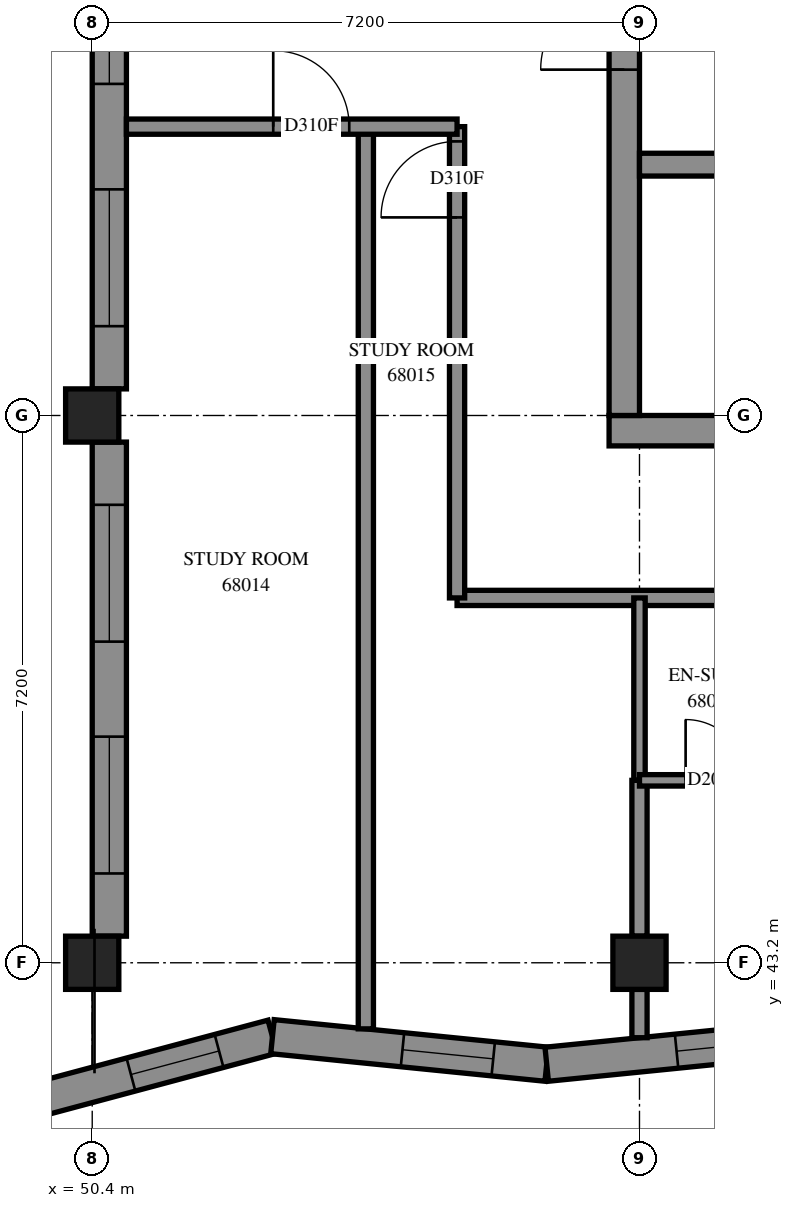
"""IFC4 building model, lengths in metres.
Left out: names, types, materials, properties, quantities, classifications, styles, units other than length and angle.
Written with IfcOpenShell. Run it as: python <this file> out.ifc"""

import sys

from ifc_helpers import new_model, si_unit, direction, frame, frame_2d, origin, origin_2d, place, context, subcontext, project, spatial, polyline, rectangle, outline, extrude, element, fill, save


model = new_model("IFC4")
c1 = context("Model", 3, precision=1e-05, world=origin(), true_north=direction((0.0, 1.0)))
c2 = subcontext(c1, "Body", "Model", "MODEL_VIEW")
j1 = project(units=[si_unit("LENGTHUNIT", "METRE"), si_unit("PLANEANGLEUNIT", "RADIAN")], contexts=[c1])
p1 = place(None, origin())
s1 = spatial("IfcSite", under=j1, at=p1, CompositionType="ELEMENT")
p2 = place(p1, origin())
s2 = spatial("IfcBuilding", under=s1, at=p2, CompositionType="ELEMENT")
p3 = place(p2, frame((0.0, 0.0, 250.6)))
s3 = spatial("IfcBuildingStorey", under=s2, at=p3, CompositionType="ELEMENT", Elevation=250.6)
for number, where, z_axis, x_axis in (
    (1, (50.4, 43.2, 0.0), (0.0, 0.0, 1.0), (1.0, 0.0, 0.0)),
    (2, (50.4, 50.4, 0.0), (0.0, 0.0, 1.0), (1.0, 0.0, 0.0)),
    (3, (57.6, 43.2, 0.0), (0.0, 0.0, 1.0), (1.0, 0.0, 0.0)),
):
    element("IfcColumn", number, at=place(p3, frame(where, z_axis=z_axis, x_axis=x_axis)), inside=s3, PredefinedType="COLUMN", context=c2, shape_type="SweptSolid", body=[
        extrude(rectangle(XDim=0.7, YDim=0.7, at=origin_2d()), origin(), (0.0, 0.0, 1.0), 3.1),
    ])
p4 = place(p3, frame((57.2, 50.2, -0.3), z_axis=(0.0, 0.0, 1.0), x_axis=(1.0, 0.0, 0.0)))
e4 = element("IfcWall", 4, at=p4, inside=s3, PredefinedType="SHEAR", context=c2, shape_type="SweptSolid", body=[
    extrude(rectangle(XDim=15.2, YDim=0.4, at=frame_2d((7.6, 0.0))), origin(), (0.0, 0.0, 1.0), 2.7),
])
p5 = place(p3, frame((57.4, 50.4, -0.3), z_axis=(0.0, 0.0, 1.0), x_axis=(0.0, 1.0, 0.0)))
e5 = element("IfcWall", 5, at=p5, inside=s3, PredefinedType="SHEAR", context=c2, shape_type="SweptSolid", body=[
    extrude(rectangle(XDim=14.4, YDim=0.4, at=frame_2d((7.2, 0.0))), origin(), (0.0, 0.0, 1.0), 2.7),
])
p6 = place(p5, frame((4.55, 0.0, 0.3)))
e6 = element("IfcOpeningElement", 6, at=p6, cuts=e5, PredefinedType="OPENING", context=c2, shape_type="SweptSolid", body=[
    extrude(rectangle(XDim=1.1, YDim=2.1, at=frame_2d((0.55, 1.05))), frame((0.0, 0.21, 0.0), z_axis=(0.0, -1.0, 0.0), x_axis=(1.0, 0.0, 0.0)), (0.0, 0.0, 1.0), 0.42),
])
p7 = place(p5, frame((11.35, 0.0, 0.3)))
e7 = element("IfcOpeningElement", 7, at=p7, cuts=e5, PredefinedType="OPENING", context=c2, shape_type="SweptSolid", body=[
    extrude(rectangle(XDim=1.1, YDim=2.1, at=frame_2d((0.55, 1.05))), frame((0.0, 0.21, 0.0), z_axis=(0.0, -1.0, 0.0), x_axis=(1.0, 0.0, 0.0)), (0.0, 0.0, 1.0), 0.42),
])
p8 = place(p3, frame((57.6, 53.7, 0.0), z_axis=(0.0, 0.0, 1.0), x_axis=(1.0, 0.0, 0.0)))
e8 = element("IfcWall", 8, at=p8, inside=s3, PredefinedType="SOLIDWALL", context=c2, shape_type="SweptSolid", body=[
    extrude(rectangle(XDim=14.4, YDim=0.3, at=frame_2d((7.2, 0.0))), origin(), (0.0, 0.0, 1.0), 3.1),
])
p9 = place(p8, frame((1.35, 0.0, 0.0)))
e9 = element("IfcOpeningElement", 9, at=p9, cuts=e8, PredefinedType="OPENING", context=c2, shape_type="SweptSolid", body=[
    extrude(rectangle(XDim=0.9, YDim=2.1, at=frame_2d((0.45, 1.05))), frame((0.0, 0.16, 0.0), z_axis=(0.0, -1.0, 0.0), x_axis=(1.0, 0.0, 0.0)), (0.0, 0.0, 1.0), 0.32),
])
p10 = place(p8, frame((4.95, 0.0, 0.0)))
e10 = element("IfcOpeningElement", 10, at=p10, cuts=e8, PredefinedType="OPENING", context=c2, shape_type="SweptSolid", body=[
    extrude(rectangle(XDim=0.9, YDim=2.1, at=frame_2d((0.45, 1.05))), frame((0.0, 0.16, 0.0), z_axis=(0.0, -1.0, 0.0), x_axis=(1.0, 0.0, 0.0)), (0.0, 0.0, 1.0), 0.32),
])
p11 = place(p8, frame((8.55, 0.0, 0.0)))
e11 = element("IfcOpeningElement", 11, at=p11, cuts=e8, PredefinedType="OPENING", context=c2, shape_type="SweptSolid", body=[
    extrude(rectangle(XDim=0.9, YDim=2.1, at=frame_2d((0.45, 1.05))), frame((0.0, 0.16, 0.0), z_axis=(0.0, -1.0, 0.0), x_axis=(1.0, 0.0, 0.0)), (0.0, 0.0, 1.0), 0.32),
])
p12 = place(p8, frame((12.05, 0.0, 0.0)))
e12 = element("IfcOpeningElement", 12, at=p12, cuts=e8, PredefinedType="OPENING", context=c2, shape_type="SweptSolid", body=[
    extrude(rectangle(XDim=1.1, YDim=2.1, at=frame_2d((0.55, 1.05))), frame((0.0, 0.16, 0.0), z_axis=(0.0, -1.0, 0.0), x_axis=(1.0, 0.0, 0.0)), (0.0, 0.0, 1.0), 0.32),
])
p13 = place(p3, frame((49.425, 41.332, 0.0), z_axis=(0.0, 0.0, 1.0), x_axis=(0.965984374, 0.258600443, 0.0)))
e13 = element("IfcWall", 13, at=p13, inside=s3, PredefinedType="SOLIDWALL", context=c2, shape_type="SweptSolid", body=[
    extrude(outline(polyline([(-0.293, -0.225), (3.423, -0.225), (3.505, 0.225), (0.293, 0.225), (-0.293, -0.225)])), origin(), (0.0, 0.0, 1.0), 3.1),
])
p14 = place(p13, frame((1.537, 0.0, 0.45)))
e14 = element("IfcOpeningElement", 14, at=p14, cuts=e13, PredefinedType="OPENING", context=c2, shape_type="SweptSolid", body=[
    extrude(rectangle(XDim=1.2, YDim=2.55, at=frame_2d((0.6, 1.275))), frame((0.0, 0.235, 0.0), z_axis=(0.0, -1.0, 0.0), x_axis=(1.0, 0.0, 0.0)), (0.0, 0.0, 1.0), 0.47),
])
p15 = place(p3, frame((52.771, 42.228, 0.0), z_axis=(0.0, 0.0, 1.0), x_axis=(0.9949796866, -0.1000770865, 0.0)))
e15 = element("IfcWall", 15, at=p15, inside=s3, PredefinedType="SOLIDWALL", context=c2, shape_type="SweptSolid", body=[
    extrude(outline(polyline([(0.041, -0.225), (3.649, -0.225), (3.604, 0.225), (-0.041, 0.225), (0.041, -0.225)])), origin(), (0.0, 0.0, 1.0), 3.1),
])
p16 = place(p15, frame((1.719, 0.0, 0.45)))
e16 = element("IfcOpeningElement", 16, at=p16, cuts=e15, PredefinedType="OPENING", context=c2, shape_type="SweptSolid", body=[
    extrude(rectangle(XDim=1.2, YDim=2.55, at=frame_2d((0.6, 1.275))), frame((0.0, 0.235, 0.0), z_axis=(0.0, -1.0, 0.0), x_axis=(1.0, 0.0, 0.0)), (0.0, 0.0, 1.0), 0.47),
])
p17 = place(p3, frame((56.379, 41.865, 0.0), z_axis=(0.0, 0.0, 1.0), x_axis=(0.994981047, 0.1000635608, 0.0)))
e17 = element("IfcWall", 17, at=p17, inside=s3, PredefinedType="SOLIDWALL", context=c2, shape_type="SweptSolid", body=[
    extrude(outline(polyline([(-0.023, -0.225), (3.585, -0.225), (3.63, 0.225), (0.023, 0.225), (-0.023, -0.225)])), origin(), (0.0, 0.0, 1.0), 3.1),
])
p18 = place(p17, frame((1.717, 0.0, 0.45)))
e18 = element("IfcOpeningElement", 18, at=p18, cuts=e17, PredefinedType="OPENING", context=c2, shape_type="SweptSolid", body=[
    extrude(rectangle(XDim=1.2, YDim=2.55, at=frame_2d((0.6, 1.275))), frame((0.0, 0.235, 0.0), z_axis=(0.0, -1.0, 0.0), x_axis=(1.0, 0.0, 0.0)), (0.0, 0.0, 1.0), 0.47),
])
p19 = place(p3, frame((50.625, 57.25, 0.0), z_axis=(0.0, 0.0, 1.0), x_axis=(0.0, -1.0, 0.0)))
e19 = element("IfcWall", 19, at=p19, inside=s3, PredefinedType="SOLIDWALL", context=c2, shape_type="SweptSolid", body=[
    extrude(rectangle(XDim=6.5, YDim=0.45, at=frame_2d((3.25, 0.0))), origin(), (0.0, 0.0, 1.0), 3.1),
])
p20 = place(p19, frame((3.875, 0.0, 0.7)))
e20 = element("IfcOpeningElement", 20, at=p20, cuts=e19, PredefinedType="OPENING", context=c2, shape_type="SweptSolid", body=[
    extrude(rectangle(XDim=1.8, YDim=1.8, at=frame_2d((0.9, 0.9))), frame((0.0, 0.235, 0.0), z_axis=(0.0, -1.0, 0.0), x_axis=(1.0, 0.0, 0.0)), (0.0, 0.0, 1.0), 0.47),
])
p21 = place(p19, frame((1.288, 0.0, 0.6)))
e21 = element("IfcOpeningElement", 21, at=p21, cuts=e19, PredefinedType="OPENING", context=c2, shape_type="SweptSolid", body=[
    extrude(rectangle(XDim=1.2, YDim=1.9, at=frame_2d((0.6, 0.95))), frame((0.0, 0.235, 0.0), z_axis=(0.0, -1.0, 0.0), x_axis=(1.0, 0.0, 0.0)), (0.0, 0.0, 1.0), 0.47),
])
p22 = place(p3, frame((50.625, 50.05, 0.0), z_axis=(0.0, 0.0, 1.0), x_axis=(0.0, -1.0, 0.0)))
e22 = element("IfcWall", 22, at=p22, inside=s3, PredefinedType="SOLIDWALL", context=c2, shape_type="SweptSolid", body=[
    extrude(rectangle(XDim=6.5, YDim=0.45, at=frame_2d((3.25, 0.0))), origin(), (0.0, 0.0, 1.0), 3.1),
])
p23 = place(p22, frame((0.825, 0.0, 0.7)))
e23 = element("IfcOpeningElement", 23, at=p23, cuts=e22, PredefinedType="OPENING", context=c2, shape_type="SweptSolid", body=[
    extrude(rectangle(XDim=1.8, YDim=1.8, at=frame_2d((0.9, 0.9))), frame((0.0, 0.235, 0.0), z_axis=(0.0, -1.0, 0.0), x_axis=(1.0, 0.0, 0.0)), (0.0, 0.0, 1.0), 0.47),
])
p24 = place(p22, frame((3.875, 0.0, 0.7)))
e24 = element("IfcOpeningElement", 24, at=p24, cuts=e22, PredefinedType="OPENING", context=c2, shape_type="SweptSolid", body=[
    extrude(rectangle(XDim=1.8, YDim=1.8, at=frame_2d((0.9, 0.9))), frame((0.0, 0.235, 0.0), z_axis=(0.0, -1.0, 0.0), x_axis=(1.0, 0.0, 0.0)), (0.0, 0.0, 1.0), 0.47),
])
p25 = place(p3, frame((55.2, 48.0, 0.0), z_axis=(0.0, 0.0, 1.0), x_axis=(1.0, 0.0, 0.0)))
e25 = element("IfcWall", 25, at=p25, inside=s3, PredefinedType="PARTITIONING", context=c2, shape_type="SweptSolid", body=[
    extrude(rectangle(XDim=19.15, YDim=0.2, at=frame_2d((9.575, 0.0))), origin(), (0.0, 0.0, 1.0), 3.1),
])
p26 = place(p25, frame((6.299, 0.0, 0.0)))
e26 = element("IfcOpeningElement", 26, at=p26, cuts=e25, PredefinedType="OPENING", context=c2, shape_type="SweptSolid", body=[
    extrude(rectangle(XDim=0.9, YDim=2.1, at=frame_2d((0.45, 1.05))), frame((0.0, 0.11, 0.0), z_axis=(0.0, -1.0, 0.0), x_axis=(1.0, 0.0, 0.0)), (0.0, 0.0, 1.0), 0.22),
])
p27 = place(p25, frame((13.499, 0.0, 0.0)))
e27 = element("IfcOpeningElement", 27, at=p27, cuts=e25, PredefinedType="OPENING", context=c2, shape_type="SweptSolid", body=[
    extrude(rectangle(XDim=0.9, YDim=2.1, at=frame_2d((0.45, 1.05))), frame((0.0, 0.11, 0.0), z_axis=(0.0, -1.0, 0.0), x_axis=(1.0, 0.0, 0.0)), (0.0, 0.0, 1.0), 0.22),
])
p28 = place(p3, frame((54.0, 42.331, 0.0), z_axis=(0.0, 0.0, 1.0), x_axis=(0.0, 1.0, 0.0)))
e28 = element("IfcWall", 28, at=p28, inside=s3, PredefinedType="PARTITIONING", context=c2, shape_type="SweptSolid", body=[
    extrude(rectangle(XDim=11.87, YDim=0.2, at=frame_2d((5.935, 0.0))), origin(), (0.0, 0.0, 1.0), 3.1),
])
p29 = place(p3, frame((55.2, 48.0, 0.0), z_axis=(0.0, 0.0, 1.0), x_axis=(0.0, 1.0, 0.0)))
e29 = element("IfcWall", 29, at=p29, inside=s3, PredefinedType="PARTITIONING", context=c2, shape_type="SweptSolid", body=[
    extrude(rectangle(XDim=6.2, YDim=0.2, at=frame_2d((3.1, 0.0))), origin(), (0.0, 0.0, 1.0), 3.1),
])
p30 = place(p29, frame((5.006, 0.0, 0.0)))
e30 = element("IfcOpeningElement", 30, at=p30, cuts=e29, PredefinedType="OPENING", context=c2, shape_type="SweptSolid", body=[
    extrude(rectangle(XDim=1.0, YDim=2.1, at=frame_2d((0.5, 1.05))), frame((0.0, 0.11, 0.0), z_axis=(0.0, -1.0, 0.0), x_axis=(1.0, 0.0, 0.0)), (0.0, 0.0, 1.0), 0.22),
])
p31 = place(p3, frame((50.85, 54.2, 0.0), z_axis=(0.0, 0.0, 1.0), x_axis=(1.0, 0.0, 0.0)))
e31 = element("IfcWall", 31, at=p31, inside=s3, PredefinedType="PARTITIONING", context=c2, shape_type="SweptSolid", body=[
    extrude(rectangle(XDim=4.35, YDim=0.2, at=frame_2d((2.175, 0.0))), origin(), (0.0, 0.0, 1.0), 3.1),
])
p32 = place(p31, frame((1.931, 0.0, 0.0)))
e32 = element("IfcOpeningElement", 32, at=p32, cuts=e31, PredefinedType="OPENING", context=c2, shape_type="SweptSolid", body=[
    extrude(rectangle(XDim=1.0, YDim=2.1, at=frame_2d((0.5, 1.05))), frame((0.0, 0.11, 0.0), z_axis=(0.0, -1.0, 0.0), x_axis=(1.0, 0.0, 0.0)), (0.0, 0.0, 1.0), 0.22),
])
p33 = place(p3, frame((57.6, 45.6, 0.0), z_axis=(0.0, 0.0, 1.0), x_axis=(0.0, 1.0, 0.0)))
e33 = element("IfcWall", 33, at=p33, inside=s3, PredefinedType="PARTITIONING", context=c2, shape_type="SweptSolid", body=[
    extrude(rectangle(XDim=2.4, YDim=0.15, at=frame_2d((1.2, 0.0))), origin(), (0.0, 0.0, 1.0), 3.1),
])
p34 = place(p3, frame((57.6, 43.55, 0.0), z_axis=(0.0, 0.0, 1.0), x_axis=(0.0, 1.0, 0.0)))
e34 = element("IfcWall", 34, at=p34, inside=s3, PredefinedType="PARTITIONING", context=c2, shape_type="SweptSolid", body=[
    extrude(rectangle(XDim=2.05, YDim=0.2, at=frame_2d((1.025, 0.0))), origin(), (0.0, 0.0, 1.0), 3.1),
])
p35 = place(p3, frame((57.6, 45.6, 0.0), z_axis=(0.0, 0.0, 1.0), x_axis=(1.0, 0.0, 0.0)))
e35 = element("IfcWall", 35, at=p35, inside=s3, PredefinedType="PARTITIONING", context=c2, shape_type="SweptSolid", body=[
    extrude(rectangle(XDim=1.9, YDim=0.15, at=frame_2d((0.95, 0.0))), origin(), (0.0, 0.0, 1.0), 3.1),
])
p36 = place(p35, frame((0.607, 0.0, 0.0)))
e36 = element("IfcOpeningElement", 36, at=p36, cuts=e35, PredefinedType="OPENING", context=c2, shape_type="SweptSolid", body=[
    extrude(rectangle(XDim=0.8, YDim=2.1, at=frame_2d((0.4, 1.05))), frame((0.0, 0.085, 0.0), z_axis=(0.0, -1.0, 0.0), x_axis=(1.0, 0.0, 0.0)), (0.0, 0.0, 1.0), 0.17),
])
p37 = place(p3, frame((57.6, 42.214, 0.0), z_axis=(0.0, 0.0, 1.0), x_axis=(0.0, 1.0, 0.0)))
e37 = element("IfcWall", 37, at=p37, inside=s3, PredefinedType="PARTITIONING", context=c2, shape_type="SweptSolid", body=[
    extrude(rectangle(XDim=0.636, YDim=0.2, at=frame_2d((0.318, 0.0))), origin(), (0.0, 0.0, 1.0), 3.1),
])
p38 = place(p14, origin())
e38 = element("IfcWindow", 38, at=p38, inside=s3, PartitioningType="SINGLE_PANEL", PredefinedType="WINDOW", context=c2, shape_type="SweptSolid", body=[
    extrude(rectangle(XDim=1.2, YDim=2.55, at=frame_2d((0.6, 1.275))), frame((0.0, 0.205, 0.0), z_axis=(0.0, -1.0, 0.0), x_axis=(1.0, 0.0, 0.0)), (0.0, 0.0, 1.0), 0.06),
])
fill(e14, e38)
p39 = place(p16, origin())
e39 = element("IfcWindow", 39, at=p39, inside=s3, PartitioningType="SINGLE_PANEL", PredefinedType="WINDOW", context=c2, shape_type="SweptSolid", body=[
    extrude(rectangle(XDim=1.2, YDim=2.55, at=frame_2d((0.6, 1.275))), frame((0.0, 0.205, 0.0), z_axis=(0.0, -1.0, 0.0), x_axis=(1.0, 0.0, 0.0)), (0.0, 0.0, 1.0), 0.06),
])
fill(e16, e39)
p40 = place(p18, origin())
e40 = element("IfcWindow", 40, at=p40, inside=s3, PartitioningType="SINGLE_PANEL", PredefinedType="WINDOW", context=c2, shape_type="SweptSolid", body=[
    extrude(rectangle(XDim=1.2, YDim=2.55, at=frame_2d((0.6, 1.275))), frame((0.0, 0.205, 0.0), z_axis=(0.0, -1.0, 0.0), x_axis=(1.0, 0.0, 0.0)), (0.0, 0.0, 1.0), 0.06),
])
fill(e18, e40)
p41 = place(p20, origin())
e41 = element("IfcWindow", 41, at=p41, inside=s3, PartitioningType="SINGLE_PANEL", PredefinedType="WINDOW", context=c2, shape_type="SweptSolid", body=[
    extrude(rectangle(XDim=1.8, YDim=1.8, at=frame_2d((0.9, 0.9))), frame((0.0, 0.205, 0.0), z_axis=(0.0, -1.0, 0.0), x_axis=(1.0, 0.0, 0.0)), (0.0, 0.0, 1.0), 0.06),
])
fill(e20, e41)
p42 = place(p23, origin())
e42 = element("IfcWindow", 42, at=p42, inside=s3, PartitioningType="SINGLE_PANEL", PredefinedType="WINDOW", context=c2, shape_type="SweptSolid", body=[
    extrude(rectangle(XDim=1.8, YDim=1.8, at=frame_2d((0.9, 0.9))), frame((0.0, 0.205, 0.0), z_axis=(0.0, -1.0, 0.0), x_axis=(1.0, 0.0, 0.0)), (0.0, 0.0, 1.0), 0.06),
])
fill(e23, e42)
p43 = place(p24, origin())
e43 = element("IfcWindow", 43, at=p43, inside=s3, PartitioningType="SINGLE_PANEL", PredefinedType="WINDOW", context=c2, shape_type="SweptSolid", body=[
    extrude(rectangle(XDim=1.8, YDim=1.8, at=frame_2d((0.9, 0.9))), frame((0.0, 0.205, 0.0), z_axis=(0.0, -1.0, 0.0), x_axis=(1.0, 0.0, 0.0)), (0.0, 0.0, 1.0), 0.06),
])
fill(e24, e43)
p44 = place(p6, origin())
e44 = element("IfcDoor", 44, at=p44, inside=s3, OperationType="DOUBLE_DOOR_SINGLE_SWING", PredefinedType="DOOR", context=c2, shape_type="SweptSolid", body=[
    extrude(rectangle(XDim=1.1, YDim=2.1, at=frame_2d((0.55, 1.05))), frame((0.0, 0.025, 0.0), z_axis=(0.0, -1.0, 0.0), x_axis=(1.0, 0.0, 0.0)), (0.0, 0.0, 1.0), 0.05),
])
fill(e6, e44)
p45 = place(p32, origin())
e45 = element("IfcDoor", 45, at=p45, inside=s3, OperationType="SINGLE_SWING_LEFT", PredefinedType="DOOR", context=c2, shape_type="SweptSolid", body=[
    extrude(rectangle(XDim=1.0, YDim=2.1, at=frame_2d((0.5, 1.05))), frame((0.0, 0.025, 0.0), z_axis=(0.0, -1.0, 0.0), x_axis=(1.0, 0.0, 0.0)), (0.0, 0.0, 1.0), 0.05),
])
fill(e32, e45)
p46 = place(p30, origin())
e46 = element("IfcDoor", 46, at=p46, inside=s3, OperationType="SINGLE_SWING_RIGHT", PredefinedType="DOOR", context=c2, shape_type="SweptSolid", body=[
    extrude(rectangle(XDim=1.0, YDim=2.1, at=frame_2d((0.5, 1.05))), frame((0.0, 0.025, 0.0), z_axis=(0.0, -1.0, 0.0), x_axis=(1.0, 0.0, 0.0)), (0.0, 0.0, 1.0), 0.05),
])
fill(e30, e46)
p47 = place(p36, origin())
e47 = element("IfcDoor", 47, at=p47, inside=s3, OperationType="SINGLE_SWING_RIGHT", PredefinedType="DOOR", context=c2, shape_type="SweptSolid", body=[
    extrude(rectangle(XDim=0.8, YDim=2.1, at=frame_2d((0.4, 1.05))), frame((0.0, 0.025, 0.0), z_axis=(0.0, -1.0, 0.0), x_axis=(1.0, 0.0, 0.0)), (0.0, 0.0, 1.0), 0.05),
])
fill(e36, e47)
p48 = place(p21, origin())
e48 = element("IfcWindow", 48, at=p48, inside=s3, PartitioningType="SINGLE_PANEL", PredefinedType="WINDOW", context=c2, shape_type="SweptSolid", body=[
    extrude(rectangle(XDim=1.2, YDim=1.9, at=frame_2d((0.6, 0.95))), frame((0.0, 0.205, 0.0), z_axis=(0.0, -1.0, 0.0), x_axis=(1.0, 0.0, 0.0)), (0.0, 0.0, 1.0), 0.06),
])
fill(e21, e48)
save(model, sys.argv[1])
